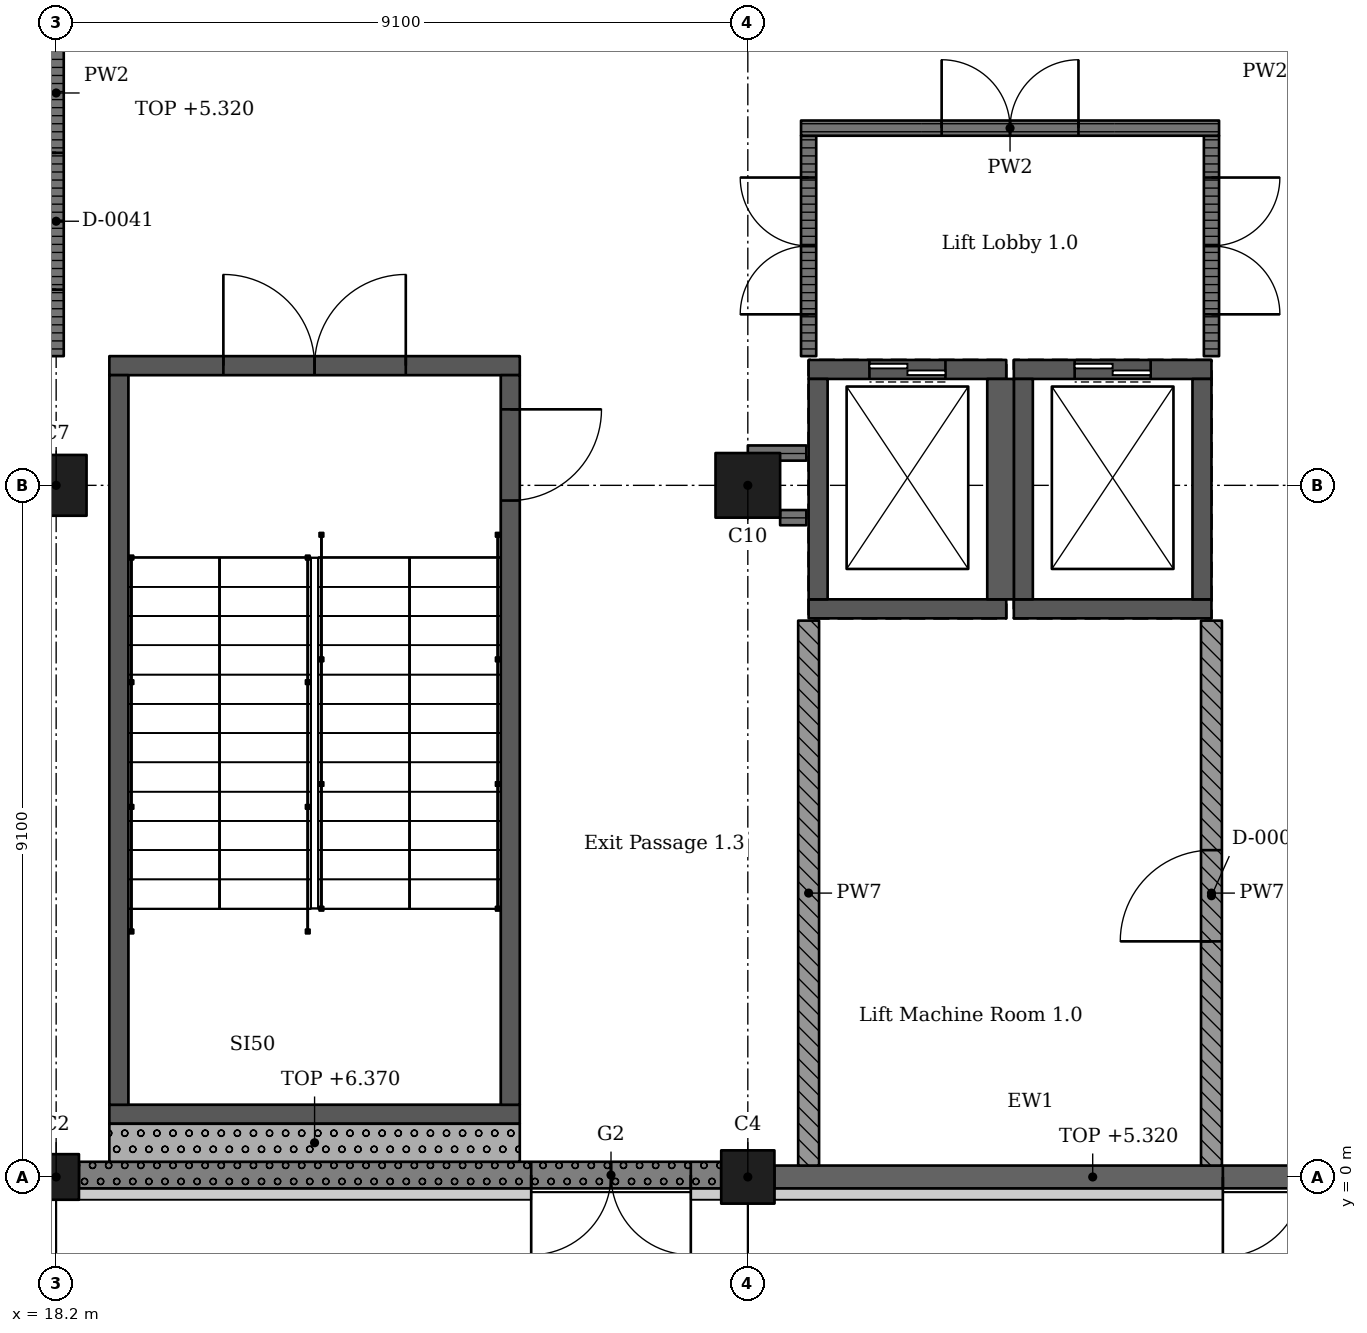
"""IFC4 building model, lengths in metres.
Left out: names, types, materials, properties, quantities, classifications, styles, units other than length and angle.
Written with IfcOpenShell. Run it as: python <this file> out.ifc"""

import sys

from ifc_helpers import new_model, si_unit, direction, frame, frame_2d, origin, origin_2d, place, context, subcontext, project, spatial, rectangle, extrude, element, fill, save


model = new_model("IFC4")
c1 = context("Model", 3, precision=1e-05, world=origin(), true_north=direction((0.0, 1.0)))
c2 = subcontext(c1, "Body", "Model", "MODEL_VIEW")
j1 = project(units=[si_unit("LENGTHUNIT", "METRE"), si_unit("PLANEANGLEUNIT", "RADIAN")], contexts=[c1])
p1 = place(None, origin())
s1 = spatial("IfcSite", under=j1, at=p1, CompositionType="ELEMENT")
p2 = place(p1, origin())
s2 = spatial("IfcBuilding", under=s1, at=p2, CompositionType="ELEMENT")
p3 = place(p2, origin())
s3 = spatial("IfcBuildingStorey", under=s2, at=p3, CompositionType="ELEMENT", Elevation=0.0)
p4 = place(p3, frame((18.2, 0.0, -0.4), z_axis=(0.0, 0.0, 1.0), x_axis=(1.0, 0.0, 0.0)))
e1 = element("IfcColumn", 1, at=p4, inside=s3, PredefinedType="COLUMN", context=c2, shape_type="SweptSolid", body=[
    extrude(rectangle(XDim=0.6, YDim=0.6, at=origin_2d()), origin(), (0.0, 0.0, 1.0), 6.77),
])
p5 = place(p3, frame((18.2, 9.1, -0.4), z_axis=(0.0, 0.0, 1.0), x_axis=(1.0, 0.0, 0.0)))
e2 = element("IfcColumn", 2, at=p5, inside=s3, PredefinedType="COLUMN", context=c2, shape_type="SweptSolid", body=[
    extrude(rectangle(XDim=0.8, YDim=0.8, at=origin_2d()), origin(), (0.0, 0.0, 1.0), 6.77),
])
p6 = place(p3, frame((27.3, 0.0, -0.4), z_axis=(0.0, 0.0, 1.0), x_axis=(1.0, 0.0, 0.0)))
e3 = element("IfcColumn", 3, at=p6, inside=s3, PredefinedType="COLUMN", context=c2, shape_type="SweptSolid", body=[
    extrude(rectangle(XDim=0.7, YDim=0.7, at=origin_2d()), origin(), (0.0, 0.0, 1.0), 6.77),
])
p7 = place(p3, frame((27.3, 9.1, -0.4), z_axis=(0.0, 0.0, 1.0), x_axis=(1.0, 0.0, 0.0)))
e4 = element("IfcColumn", 4, at=p7, inside=s3, PredefinedType="COLUMN", context=c2, shape_type="SweptSolid", body=[
    extrude(rectangle(XDim=0.85, YDim=0.85, at=origin_2d()), origin(), (0.0, 0.0, 1.0), 6.77),
])
p8 = place(p3, frame((30.7, 7.475, -1.4), z_axis=(0.0, 0.0, 1.0), x_axis=(-1.0, 0.0, 0.0)))
e5 = element("IfcWall", 5, at=p8, inside=s3, PredefinedType="SHEAR", context=c2, shape_type="SweptSolid", body=[
    extrude(rectangle(XDim=2.6, YDim=0.25, at=frame_2d((1.3, 0.0))), origin(), (0.0, 0.0, 1.0), 7.77),
])
p9 = place(p3, frame((30.7, 10.625, -1.4), z_axis=(0.0, 0.0, 1.0), x_axis=(-1.0, 0.0, 0.0)))
e6 = element("IfcWall", 6, at=p9, inside=s3, PredefinedType="SHEAR", context=c2, shape_type="SweptSolid", body=[
    extrude(rectangle(XDim=2.6, YDim=0.25, at=frame_2d((1.3, 0.0))), origin(), (0.0, 0.0, 1.0), 7.77),
])
p10 = place(p9, frame((0.8, 0.0, 1.4)))
e7 = element("IfcOpeningElement", 7, at=p10, cuts=e6, PredefinedType="OPENING", context=c2, shape_type="SweptSolid", body=[
    extrude(rectangle(XDim=1.0, YDim=2.1, at=frame_2d((0.5, 1.05))), frame((0.0, 0.135, 0.0), z_axis=(0.0, -1.0, 0.0), x_axis=(1.0, 0.0, 0.0)), (0.0, 0.0, 1.0), 0.27),
])
p11 = place(p3, frame((28.225, 10.5, -1.4), z_axis=(0.0, 0.0, 1.0), x_axis=(0.0, -1.0, 0.0)))
e8 = element("IfcWall", 8, at=p11, inside=s3, PredefinedType="SHEAR", context=c2, shape_type="SweptSolid", body=[
    extrude(rectangle(XDim=2.9, YDim=0.25, at=frame_2d((1.45, 0.0))), origin(), (0.0, 0.0, 1.0), 7.77),
])
p12 = place(p3, frame((30.625, 10.5, -1.4), z_axis=(0.0, 0.0, 1.0), x_axis=(0.0, -1.0, 0.0)))
e9 = element("IfcWall", 9, at=p12, inside=s3, PredefinedType="SHEAR", context=c2, shape_type="SweptSolid", body=[
    extrude(rectangle(XDim=2.9, YDim=0.35, at=frame_2d((1.45, 0.0))), origin(), (0.0, 0.0, 1.0), 7.77),
])
p13 = place(p3, frame((33.4, 7.475, -1.4), z_axis=(0.0, 0.0, 1.0), x_axis=(-1.0, 0.0, 0.0)))
e10 = element("IfcWall", 10, at=p13, inside=s3, PredefinedType="SHEAR", context=c2, shape_type="SweptSolid", body=[
    extrude(rectangle(XDim=2.6, YDim=0.25, at=frame_2d((1.3, 0.0))), origin(), (0.0, 0.0, 1.0), 7.77),
])
p14 = place(p3, frame((33.4, 10.625, -1.4), z_axis=(0.0, 0.0, 1.0), x_axis=(-1.0, 0.0, 0.0)))
e11 = element("IfcWall", 11, at=p14, inside=s3, PredefinedType="SHEAR", context=c2, shape_type="SweptSolid", body=[
    extrude(rectangle(XDim=2.6, YDim=0.25, at=frame_2d((1.3, 0.0))), origin(), (0.0, 0.0, 1.0), 7.77),
])
p15 = place(p14, frame((0.8, 0.0, 1.4)))
e12 = element("IfcOpeningElement", 12, at=p15, cuts=e11, PredefinedType="OPENING", context=c2, shape_type="SweptSolid", body=[
    extrude(rectangle(XDim=1.0, YDim=2.1, at=frame_2d((0.5, 1.05))), frame((0.0, 0.135, 0.0), z_axis=(0.0, -1.0, 0.0), x_axis=(1.0, 0.0, 0.0)), (0.0, 0.0, 1.0), 0.27),
])
for number, where, z_axis, x_axis in (
    (13, (30.925, 10.5, -1.4), (0.0, 0.0, 1.0), (0.0, -1.0, 0.0)),
    (14, (33.275, 10.5, -1.4), (0.0, 0.0, 1.0), (0.0, -1.0, 0.0)),
):
    element("IfcWall", number, at=place(p3, frame(where, z_axis=z_axis, x_axis=x_axis)), inside=s3, PredefinedType="SHEAR", context=c2, shape_type="SweptSolid", body=[
        extrude(rectangle(XDim=2.9, YDim=0.25, at=frame_2d((1.45, 0.0))), origin(), (0.0, 0.0, 1.0), 7.77),
    ])
p16 = place(p3, frame((24.3, 0.825, -0.4), z_axis=(0.0, 0.0, 1.0), x_axis=(-1.0, 0.0, 0.0)))
e15 = element("IfcWall", 15, at=p16, inside=s3, PredefinedType="SHEAR", context=c2, shape_type="SweptSolid", body=[
    extrude(rectangle(XDim=5.4, YDim=0.25, at=frame_2d((2.7, 0.0))), origin(), (0.0, 0.0, 1.0), 6.77),
])
p17 = place(p3, frame((24.3, 10.675, -0.4), z_axis=(0.0, 0.0, 1.0), x_axis=(-1.0, 0.0, 0.0)))
e16 = element("IfcWall", 16, at=p17, inside=s3, PredefinedType="SHEAR", context=c2, shape_type="SweptSolid", body=[
    extrude(rectangle(XDim=5.4, YDim=0.25, at=frame_2d((2.7, 0.0))), origin(), (0.0, 0.0, 1.0), 6.77),
])
p18 = place(p17, frame((1.5, 0.0, 0.4)))
e17 = element("IfcOpeningElement", 17, at=p18, cuts=e16, PredefinedType="OPENING", context=c2, shape_type="SweptSolid", body=[
    extrude(rectangle(XDim=2.4, YDim=2.1, at=frame_2d((1.2, 1.05))), frame((0.0, 0.135, 0.0), z_axis=(0.0, -1.0, 0.0), x_axis=(1.0, 0.0, 0.0)), (0.0, 0.0, 1.0), 0.27),
])
p19 = place(p3, frame((19.025, 10.55, -0.4), z_axis=(0.0, 0.0, 1.0), x_axis=(0.0, -1.0, 0.0)))
e18 = element("IfcWall", 18, at=p19, inside=s3, PredefinedType="SHEAR", context=c2, shape_type="SweptSolid", body=[
    extrude(rectangle(XDim=9.6, YDim=0.25, at=frame_2d((4.8, 0.0))), origin(), (0.0, 0.0, 1.0), 6.77),
])
p20 = place(p3, frame((24.175, 10.55, -0.4), z_axis=(0.0, 0.0, 1.0), x_axis=(0.0, -1.0, 0.0)))
e19 = element("IfcWall", 19, at=p20, inside=s3, PredefinedType="SHEAR", context=c2, shape_type="SweptSolid", body=[
    extrude(rectangle(XDim=9.6, YDim=0.25, at=frame_2d((4.8, 0.0))), origin(), (0.0, 0.0, 1.0), 6.77),
])
p21 = place(p20, frame((0.45, 0.0, 0.4)))
e20 = element("IfcOpeningElement", 20, at=p21, cuts=e19, PredefinedType="OPENING", context=c2, shape_type="SweptSolid", body=[
    extrude(rectangle(XDim=1.2, YDim=2.1, at=frame_2d((0.6, 1.05))), frame((0.0, 0.135, 0.0), z_axis=(0.0, -1.0, 0.0), x_axis=(1.0, 0.0, 0.0)), (0.0, 0.0, 1.0), 0.27),
])
p22 = place(p3, frame((18.5, 0.025, 0.0), z_axis=(0.0, 0.0, 1.0), x_axis=(1.0, 0.0, 0.0)))
e21 = element("IfcWall", 21, at=p22, inside=s3, PredefinedType="SOLIDWALL", context=c2, shape_type="SweptSolid", body=[
    extrude(rectangle(XDim=8.45, YDim=0.35, at=frame_2d((4.225, 0.0))), origin(), (0.0, 0.0, 1.0), 5.27),
])
p23 = place(p22, frame((5.95, 0.0, 0.0)))
e22 = element("IfcOpeningElement", 22, at=p23, cuts=e21, PredefinedType="OPENING", context=c2, shape_type="SweptSolid", body=[
    extrude(rectangle(XDim=2.1, YDim=2.4, at=frame_2d((1.05, 1.2))), frame((0.0, 0.185, 0.0), z_axis=(0.0, -1.0, 0.0), x_axis=(1.0, 0.0, 0.0)), (0.0, 0.0, 1.0), 0.37),
])
p24 = place(p3, frame((27.65, 0.0, 0.0), z_axis=(0.0, 0.0, 1.0), x_axis=(1.0, 0.0, 0.0)))
e23 = element("IfcWall", 23, at=p24, inside=s3, PredefinedType="SOLIDWALL", context=c2, shape_type="SweptSolid", body=[
    extrude(rectangle(XDim=8.375, YDim=0.3, at=frame_2d((4.188, 0.0))), origin(), (0.0, 0.0, 1.0), 5.32),
])
p25 = place(p24, frame((5.9, 0.0, 0.0)))
e24 = element("IfcOpeningElement", 24, at=p25, cuts=e23, PredefinedType="OPENING", context=c2, shape_type="SweptSolid", body=[
    extrude(rectangle(XDim=2.1, YDim=2.4, at=frame_2d((1.05, 1.2))), frame((0.0, 0.16, 0.0), z_axis=(0.0, -1.0, 0.0), x_axis=(1.0, 0.0, 0.0)), (0.0, 0.0, 1.0), 0.32),
])
p26 = place(p3, frame((18.9, 0.45, 0.0), z_axis=(0.0, 0.0, 1.0), x_axis=(1.0, 0.0, 0.0)))
e25 = element("IfcWall", 25, at=p26, inside=s3, PredefinedType="SOLIDWALL", context=c2, shape_type="SweptSolid", body=[
    extrude(rectangle(XDim=5.4, YDim=0.5, at=frame_2d((2.7, 0.0))), origin(), (0.0, 0.0, 1.0), 6.37),
])
p27 = place(p3, frame((18.2, 17.725, 0.0), z_axis=(0.0, 0.0, 1.0), x_axis=(0.0, -1.0, 0.0)))
e26 = element("IfcWall", 26, at=p27, inside=s3, PredefinedType="PARTITIONING", context=c2, shape_type="SweptSolid", body=[
    extrude(rectangle(XDim=6.925, YDim=0.2, at=frame_2d((3.462, 0.0))), origin(), (0.0, 0.0, 1.0), 5.32),
])
p28 = place(p27, frame((0.85, 0.0, 0.0)))
e27 = element("IfcOpeningElement", 27, at=p28, cuts=e26, PredefinedType="OPENING", context=c2, shape_type="SweptSolid", body=[
    extrude(rectangle(XDim=1.8, YDim=2.4, at=frame_2d((0.9, 1.2))), frame((0.0, 0.11, 0.0), z_axis=(0.0, -1.0, 0.0), x_axis=(1.0, 0.0, 0.0)), (0.0, 0.0, 1.0), 0.22),
])
p29 = place(p27, frame((4.25, 0.0, 0.0)))
e28 = element("IfcOpeningElement", 28, at=p29, cuts=e26, PredefinedType="OPENING", context=c2, shape_type="SweptSolid", body=[
    extrude(rectangle(XDim=1.8, YDim=2.4, at=frame_2d((0.9, 1.2))), frame((0.0, 0.11, 0.0), z_axis=(0.0, -1.0, 0.0), x_axis=(1.0, 0.0, 0.0)), (0.0, 0.0, 1.0), 0.22),
])
p30 = place(p3, frame((27.3, 9.525, 0.0), z_axis=(0.0, 0.0, 1.0), x_axis=(1.0, 0.0, 0.0)))
e29 = element("IfcWall", 29, at=p30, inside=s3, PredefinedType="PARTITIONING", context=c2, shape_type="SweptSolid", body=[
    extrude(rectangle(XDim=0.77, YDim=0.2, at=frame_2d((0.385, 0.0))), origin(), (0.0, 0.0, 1.0), 6.02),
])
p31 = place(p3, frame((27.725, 8.675, 0.0), z_axis=(0.0, 0.0, 1.0), x_axis=(1.0, 0.0, 0.0)))
e30 = element("IfcWall", 30, at=p31, inside=s3, PredefinedType="PARTITIONING", context=c2, shape_type="SweptSolid", body=[
    extrude(rectangle(XDim=0.345, YDim=0.2, at=frame_2d((0.172, 0.0))), origin(), (0.0, 0.0, 1.0), 6.02),
])
p32 = place(p3, frame((28.1, 0.15, 0.0), z_axis=(0.0, 0.0, 1.0), x_axis=(0.0, 1.0, 0.0)))
e31 = element("IfcWall", 31, at=p32, inside=s3, PredefinedType="SOLIDWALL", context=c2, shape_type="SweptSolid", body=[
    extrude(rectangle(XDim=7.17, YDim=0.275, at=frame_2d((3.585, 0.0))), origin(), (0.0, 0.0, 1.0), 6.02),
])
p33 = place(p3, frame((28.1, 13.7, 0.0), z_axis=(0.0, 0.0, 1.0), x_axis=(0.0, -1.0, 0.0)))
e32 = element("IfcWall", 32, at=p33, inside=s3, PredefinedType="PARTITIONING", context=c2, shape_type="SweptSolid", body=[
    extrude(rectangle(XDim=2.9, YDim=0.2, at=frame_2d((1.45, 0.0))), origin(), (0.0, 0.0, 1.0), 6.02),
])
p34 = place(p33, frame((0.55, 0.0, 0.0)))
e33 = element("IfcOpeningElement", 33, at=p34, cuts=e32, PredefinedType="OPENING", context=c2, shape_type="SweptSolid", body=[
    extrude(rectangle(XDim=1.8, YDim=2.4, at=frame_2d((0.9, 1.2))), frame((0.0, 0.11, 0.0), z_axis=(0.0, -1.0, 0.0), x_axis=(1.0, 0.0, 0.0)), (0.0, 0.0, 1.0), 0.22),
])
p35 = place(p3, frame((33.4, 0.15, 0.0), z_axis=(0.0, 0.0, 1.0), x_axis=(0.0, 1.0, 0.0)))
e34 = element("IfcWall", 34, at=p35, inside=s3, PredefinedType="SOLIDWALL", context=c2, shape_type="SweptSolid", body=[
    extrude(rectangle(XDim=7.17, YDim=0.275, at=frame_2d((3.585, 0.0))), origin(), (0.0, 0.0, 1.0), 6.02),
])
p36 = place(p35, frame((2.95, 0.0, 0.0)))
e35 = element("IfcOpeningElement", 35, at=p36, cuts=e34, PredefinedType="OPENING", context=c2, shape_type="SweptSolid", body=[
    extrude(rectangle(XDim=1.2, YDim=2.4, at=frame_2d((0.6, 1.2))), frame((0.0, 0.147, 0.0), z_axis=(0.0, -1.0, 0.0), x_axis=(1.0, 0.0, 0.0)), (0.0, 0.0, 1.0), 0.295),
])
p37 = place(p3, frame((33.4, 10.8, 0.0), z_axis=(0.0, 0.0, 1.0), x_axis=(0.0, 1.0, 0.0)))
e36 = element("IfcWall", 36, at=p37, inside=s3, PredefinedType="PARTITIONING", context=c2, shape_type="SweptSolid", body=[
    extrude(rectangle(XDim=2.9, YDim=0.2, at=frame_2d((1.45, 0.0))), origin(), (0.0, 0.0, 1.0), 6.02),
])
p38 = place(p37, frame((0.55, 0.0, 0.0)))
e37 = element("IfcOpeningElement", 37, at=p38, cuts=e36, PredefinedType="OPENING", context=c2, shape_type="SweptSolid", body=[
    extrude(rectangle(XDim=1.8, YDim=2.4, at=frame_2d((0.9, 1.2))), frame((0.0, 0.11, 0.0), z_axis=(0.0, -1.0, 0.0), x_axis=(1.0, 0.0, 0.0)), (0.0, 0.0, 1.0), 0.22),
])
p39 = place(p3, frame((33.5, 13.8, 0.0), z_axis=(0.0, 0.0, 1.0), x_axis=(-1.0, 0.0, 0.0)))
e38 = element("IfcWall", 38, at=p39, inside=s3, PredefinedType="PARTITIONING", context=c2, shape_type="SweptSolid", body=[
    extrude(rectangle(XDim=5.5, YDim=0.2, at=frame_2d((2.75, 0.0))), origin(), (0.0, 0.0, 1.0), 6.02),
])
p40 = place(p39, frame((1.85, 0.0, 0.0)))
e39 = element("IfcOpeningElement", 39, at=p40, cuts=e38, PredefinedType="OPENING", context=c2, shape_type="SweptSolid", body=[
    extrude(rectangle(XDim=1.8, YDim=2.4, at=frame_2d((0.9, 1.2))), frame((0.0, 0.11, 0.0), z_axis=(0.0, -1.0, 0.0), x_axis=(1.0, 0.0, 0.0)), (0.0, 0.0, 1.0), 0.22),
])
p41 = place(p23, frame((2.1, 0.0, 0.0), z_axis=(0.0, 0.0, 1.0), x_axis=(-1.0, 0.0, 0.0)))
e40 = element("IfcDoor", 40, at=p41, inside=s3, OperationType="DOUBLE_DOOR_SINGLE_SWING", PredefinedType="DOOR", context=c2, shape_type="SweptSolid", body=[
    extrude(rectangle(XDim=2.1, YDim=2.4, at=frame_2d((1.05, 1.2))), frame((0.0, 0.025, 0.0), z_axis=(0.0, -1.0, 0.0), x_axis=(1.0, 0.0, 0.0)), (0.0, 0.0, 1.0), 0.05),
])
fill(e22, e40)
p42 = place(p25, frame((2.1, 0.0, 0.0), z_axis=(0.0, 0.0, 1.0), x_axis=(-1.0, 0.0, 0.0)))
e41 = element("IfcDoor", 41, at=p42, inside=s3, OperationType="DOUBLE_DOOR_SINGLE_SWING", PredefinedType="DOOR", context=c2, shape_type="SweptSolid", body=[
    extrude(rectangle(XDim=2.1, YDim=2.4, at=frame_2d((1.05, 1.2))), frame((0.0, 0.025, 0.0), z_axis=(0.0, -1.0, 0.0), x_axis=(1.0, 0.0, 0.0)), (0.0, 0.0, 1.0), 0.05),
])
fill(e24, e41)
p43 = place(p36, origin())
e42 = element("IfcDoor", 42, at=p43, inside=s3, OperationType="SINGLE_SWING_RIGHT", PredefinedType="DOOR", context=c2, shape_type="SweptSolid", body=[
    extrude(rectangle(XDim=1.2, YDim=2.4, at=frame_2d((0.6, 1.2))), frame((0.0, 0.025, 0.0), z_axis=(0.0, -1.0, 0.0), x_axis=(1.0, 0.0, 0.0)), (0.0, 0.0, 1.0), 0.05),
])
fill(e35, e42)
p44 = place(p29, origin())
e43 = element("IfcDoor", 43, at=p44, inside=s3, OperationType="DOUBLE_DOOR_SINGLE_SWING", PredefinedType="DOOR", context=c2, shape_type="SweptSolid", body=[
    extrude(rectangle(XDim=1.8, YDim=2.4, at=frame_2d((0.9, 1.2))), frame((0.0, 0.025, 0.0), z_axis=(0.0, -1.0, 0.0), x_axis=(1.0, 0.0, 0.0)), (0.0, 0.0, 1.0), 0.05),
])
fill(e28, e43)
p45 = place(p40, origin())
e44 = element("IfcDoor", 44, at=p45, inside=s3, OperationType="DOUBLE_DOOR_SINGLE_SWING", PredefinedType="DOOR", context=c2, shape_type="SweptSolid", body=[
    extrude(rectangle(XDim=1.8, YDim=2.4, at=frame_2d((0.9, 1.2))), frame((0.0, 0.025, 0.0), z_axis=(0.0, -1.0, 0.0), x_axis=(1.0, 0.0, 0.0)), (0.0, 0.0, 1.0), 0.05),
])
fill(e39, e44)
p46 = place(p34, origin())
e45 = element("IfcDoor", 45, at=p46, inside=s3, OperationType="DOUBLE_DOOR_SINGLE_SWING", PredefinedType="DOOR", context=c2, shape_type="SweptSolid", body=[
    extrude(rectangle(XDim=1.8, YDim=2.4, at=frame_2d((0.9, 1.2))), frame((0.0, 0.025, 0.0), z_axis=(0.0, -1.0, 0.0), x_axis=(1.0, 0.0, 0.0)), (0.0, 0.0, 1.0), 0.05),
])
fill(e33, e45)
p47 = place(p38, origin())
e46 = element("IfcDoor", 46, at=p47, inside=s3, OperationType="DOUBLE_DOOR_SINGLE_SWING", PredefinedType="DOOR", context=c2, shape_type="SweptSolid", body=[
    extrude(rectangle(XDim=1.8, YDim=2.4, at=frame_2d((0.9, 1.2))), frame((0.0, 0.025, 0.0), z_axis=(0.0, -1.0, 0.0), x_axis=(1.0, 0.0, 0.0)), (0.0, 0.0, 1.0), 0.05),
])
fill(e37, e46)
p48 = place(p18, origin())
e47 = element("IfcDoor", 47, at=p48, inside=s3, OperationType="DOUBLE_DOOR_SINGLE_SWING", PredefinedType="DOOR", context=c2, shape_type="SweptSolid", body=[
    extrude(rectangle(XDim=2.4, YDim=2.1, at=frame_2d((1.2, 1.05))), frame((0.0, 0.025, 0.0), z_axis=(0.0, -1.0, 0.0), x_axis=(1.0, 0.0, 0.0)), (0.0, 0.0, 1.0), 0.05),
])
fill(e17, e47)
p49 = place(p21, origin())
e48 = element("IfcDoor", 48, at=p49, inside=s3, OperationType="SINGLE_SWING_RIGHT", PredefinedType="DOOR", context=c2, shape_type="SweptSolid", body=[
    extrude(rectangle(XDim=1.2, YDim=2.1, at=frame_2d((0.6, 1.05))), frame((0.0, 0.025, 0.0), z_axis=(0.0, -1.0, 0.0), x_axis=(1.0, 0.0, 0.0)), (0.0, 0.0, 1.0), 0.05),
])
fill(e20, e48)
p50 = place(p10, origin())
e49 = element("IfcDoor", 49, at=p50, inside=s3, OperationType="DOUBLE_DOOR_SLIDING", PredefinedType="DOOR", context=c2, shape_type="SweptSolid", body=[
    extrude(rectangle(XDim=1.0, YDim=2.1, at=frame_2d((0.5, 1.05))), frame((0.0, 0.025, 0.0), z_axis=(0.0, -1.0, 0.0), x_axis=(1.0, 0.0, 0.0)), (0.0, 0.0, 1.0), 0.05),
])
fill(e7, e49)
p51 = place(p15, origin())
e50 = element("IfcDoor", 50, at=p51, inside=s3, OperationType="DOUBLE_DOOR_SLIDING", PredefinedType="DOOR", context=c2, shape_type="SweptSolid", body=[
    extrude(rectangle(XDim=1.0, YDim=2.1, at=frame_2d((0.5, 1.05))), frame((0.0, 0.025, 0.0), z_axis=(0.0, -1.0, 0.0), x_axis=(1.0, 0.0, 0.0)), (0.0, 0.0, 1.0), 0.05),
])
fill(e12, e50)
save(model, sys.argv[1])
